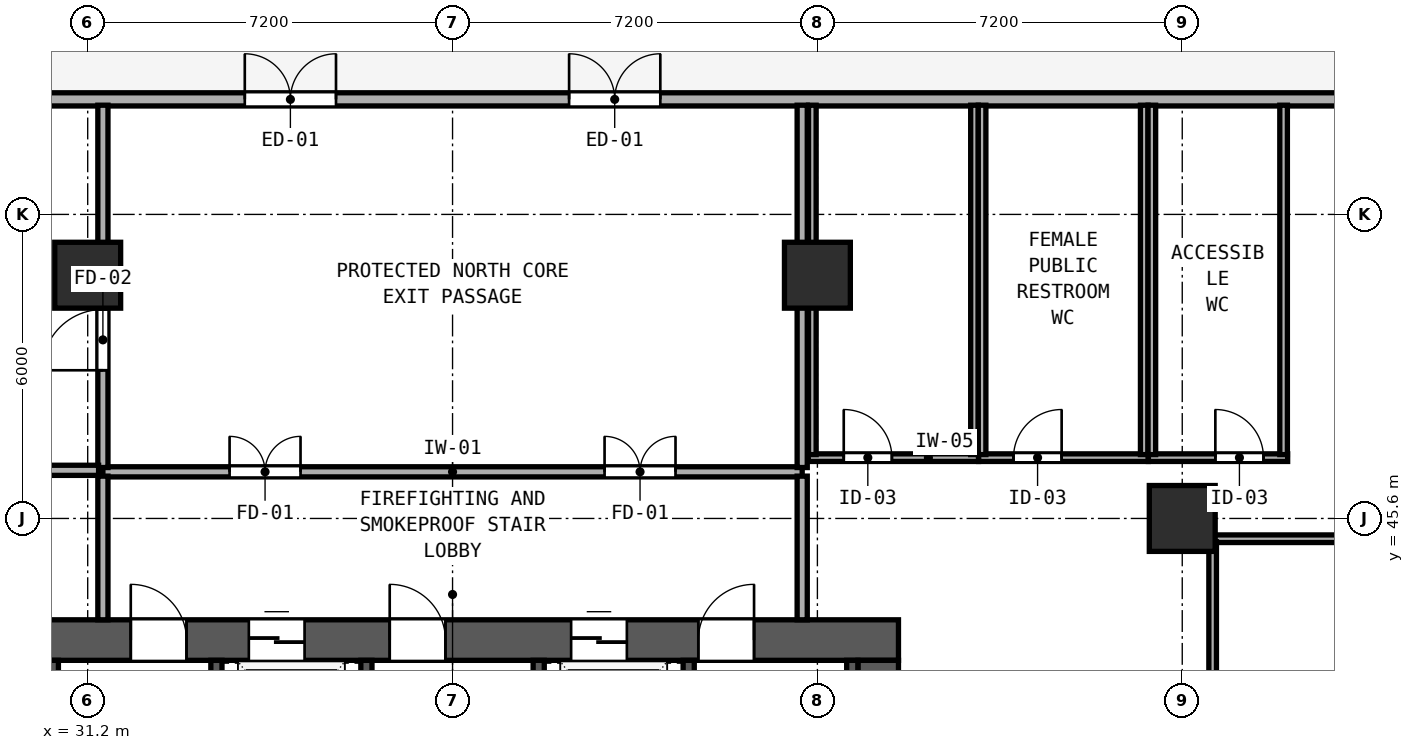
"""IFC4 building model, lengths in metres.
Left out: names, types, materials, properties, quantities, classifications, styles, units other than length and angle.
Written with IfcOpenShell. Run it as: python <this file> out.ifc"""

import sys

from ifc_helpers import new_model, si_unit, direction, frame, frame_2d, origin, origin_2d, place, context, subcontext, project, spatial, rectangle, hollow_rectangle, extrude, element, fill, save


model = new_model("IFC4")
c1 = context("Model", 3, precision=1e-05, world=origin(), true_north=direction((0.0, 1.0)))
c2 = subcontext(c1, "Body", "Model", "MODEL_VIEW")
j1 = project(units=[si_unit("LENGTHUNIT", "METRE"), si_unit("PLANEANGLEUNIT", "RADIAN")], contexts=[c1])
p1 = place(None, origin())
s1 = spatial("IfcSite", under=j1, at=p1, CompositionType="ELEMENT")
p2 = place(p1, origin())
s2 = spatial("IfcBuilding", under=s1, at=p2, CompositionType="ELEMENT")
p3 = place(p2, origin())
s3 = spatial("IfcBuildingStorey", under=s2, at=p3, CompositionType="ELEMENT", Elevation=0.0)
p4 = place(p3, frame((29.6, 43.2, 0.0), z_axis=(0.0, 0.0, 1.0), x_axis=(1.0, 0.0, 0.0)))
e1 = element("IfcWall", 1, at=p4, inside=s3, PredefinedType="SHEAR", context=c2, shape_type="SweptSolid", body=[
    extrude(rectangle(XDim=17.6, YDim=0.8, at=frame_2d((8.8, 0.0))), origin(), (0.0, 0.0, 1.0), 5.16),
])
p5 = place(p4, frame((2.45, 0.0, 0.0)))
e2 = element("IfcOpeningElement", 2, at=p5, cuts=e1, PredefinedType="OPENING", context=c2, shape_type="SweptSolid", body=[
    extrude(rectangle(XDim=1.1, YDim=2.15, at=frame_2d((0.55, 1.075))), frame((0.0, 0.41, 0.0), z_axis=(0.0, -1.0, 0.0), x_axis=(1.0, 0.0, 0.0)), (0.0, 0.0, 1.0), 0.82),
])
p6 = place(p4, frame((7.56, 0.0, 0.0)))
e3 = element("IfcOpeningElement", 3, at=p6, cuts=e1, PredefinedType="OPENING", context=c2, shape_type="SweptSolid", body=[
    extrude(rectangle(XDim=1.1, YDim=2.15, at=frame_2d((0.55, 1.075))), frame((0.0, 0.41, 0.0), z_axis=(0.0, -1.0, 0.0), x_axis=(1.0, 0.0, 0.0)), (0.0, 0.0, 1.0), 0.82),
])
p7 = place(p4, frame((13.65, 0.0, 0.0)))
e4 = element("IfcOpeningElement", 4, at=p7, cuts=e1, PredefinedType="OPENING", context=c2, shape_type="SweptSolid", body=[
    extrude(rectangle(XDim=1.1, YDim=2.15, at=frame_2d((0.55, 1.075))), frame((0.0, 0.41, 0.0), z_axis=(0.0, -1.0, 0.0), x_axis=(1.0, 0.0, 0.0)), (0.0, 0.0, 1.0), 0.82),
])
p8 = place(p4, frame((4.78, 0.0, 0.0)))
e5 = element("IfcOpeningElement", 5, at=p8, cuts=e1, PredefinedType="OPENING", context=c2, shape_type="SweptSolid", body=[
    extrude(rectangle(XDim=1.1, YDim=2.2, at=frame_2d((0.55, 1.1))), frame((0.0, 0.41, 0.0), z_axis=(0.0, -1.0, 0.0), x_axis=(1.0, 0.0, 0.0)), (0.0, 0.0, 1.0), 0.82),
])
p9 = place(p4, frame((11.14, 0.0, 0.0)))
e6 = element("IfcOpeningElement", 6, at=p9, cuts=e1, PredefinedType="OPENING", context=c2, shape_type="SweptSolid", body=[
    extrude(rectangle(XDim=1.1, YDim=2.2, at=frame_2d((0.55, 1.1))), frame((0.0, 0.41, 0.0), z_axis=(0.0, -1.0, 0.0), x_axis=(1.0, 0.0, 0.0)), (0.0, 0.0, 1.0), 0.82),
])
p10 = place(p3, frame((46.8, 32.8, 0.0), z_axis=(0.0, 0.0, 1.0), x_axis=(0.0, 1.0, 0.0)))
e7 = element("IfcWall", 7, at=p10, inside=s3, PredefinedType="SHEAR", context=c2, shape_type="SweptSolid", body=[
    extrude(rectangle(XDim=10.0, YDim=0.8, at=frame_2d((5.0, 0.0))), origin(), (0.0, 0.0, 1.0), 5.16),
])
for number, where, z_axis, x_axis in (
    (8, (30.512, 35.39, 0.0), (0.0, 0.0, 1.0), (0.0, 1.0, 0.0)),
    (9, (33.74, 35.39, 0.0), (0.0, 0.0, 1.0), (0.0, 1.0, 0.0)),
    (10, (36.7, 35.39, 0.0), (0.0, 0.0, 1.0), (0.0, 1.0, 0.0)),
    (11, (40.1, 35.39, 0.0), (0.0, 0.0, 1.0), (0.0, 1.0, 0.0)),
    (12, (43.06, 35.39, 0.0), (0.0, 0.0, 1.0), (0.0, 1.0, 0.0)),
    (13, (46.288, 35.39, 0.0), (0.0, 0.0, 1.0), (0.0, 1.0, 0.0)),
):
    element("IfcWall", number, at=place(p3, frame(where, z_axis=z_axis, x_axis=x_axis)), inside=s3, PredefinedType="SHEAR", context=c2, shape_type="SweptSolid", body=[
        extrude(rectangle(XDim=7.41, YDim=0.22, at=frame_2d((3.705, 0.0))), origin(), (0.0, 0.0, 1.0), 5.16),
    ])
for number, where, z_axis, x_axis in (
    (14, (52.8, 45.6, 0.0), (0.0, 0.0, 1.0), (1.0, 0.0, 0.0)),
    (15, (31.2, 50.4, 0.0), (0.0, 0.0, 1.0), (1.0, 0.0, 0.0)),
    (16, (45.6, 50.4, 0.0), (0.0, 0.0, 1.0), (1.0, 0.0, 0.0)),
):
    element("IfcColumn", number, at=place(p3, frame(where, z_axis=z_axis, x_axis=x_axis)), inside=s3, PredefinedType="COLUMN", context=c2, shape_type="SweptSolid", body=[
        extrude(hollow_rectangle(XDim=1.3, YDim=1.3, WallThickness=0.048, at=origin_2d()), origin(), (0.0, 0.0, 1.0), 5.4),
    ])
p11 = place(p3, frame((76.725, 53.87, 0.0), z_axis=(0.0, 0.0, 1.0), x_axis=(-1.0, 0.0, 0.0)))
e17 = element("IfcWall", 17, at=p11, inside=s3, PredefinedType="SOLIDWALL", context=c2, shape_type="SweptSolid", body=[
    extrude(rectangle(XDim=76.65, YDim=0.26, at=frame_2d((38.325, 0.0))), origin(), (0.0, 0.0, 1.0), 5.16),
])
p12 = place(p11, frame((42.425, 0.0, 0.0), z_axis=(0.0, 0.0, 1.0), x_axis=(-1.0, 0.0, 0.0)))
e18 = element("IfcOpeningElement", 18, at=p12, cuts=e17, PredefinedType="OPENING", context=c2, shape_type="SweptSolid", body=[
    extrude(rectangle(XDim=1.8, YDim=2.35, at=frame_2d((0.9, 1.175))), frame((0.0, 0.14, 0.0), z_axis=(0.0, -1.0, 0.0), x_axis=(1.0, 0.0, 0.0)), (0.0, 0.0, 1.0), 0.28),
])
p13 = place(p11, frame((36.025, 0.0, 0.0), z_axis=(0.0, 0.0, 1.0), x_axis=(-1.0, 0.0, 0.0)))
e19 = element("IfcOpeningElement", 19, at=p13, cuts=e17, PredefinedType="OPENING", context=c2, shape_type="SweptSolid", body=[
    extrude(rectangle(XDim=1.8, YDim=2.35, at=frame_2d((0.9, 1.175))), frame((0.0, 0.14, 0.0), z_axis=(0.0, -1.0, 0.0), x_axis=(1.0, 0.0, 0.0)), (0.0, 0.0, 1.0), 0.28),
])
p14 = place(p11, frame((49.475, 0.0, 0.0), z_axis=(0.0, 0.0, 1.0), x_axis=(-1.0, 0.0, 0.0)))
e20 = element("IfcOpeningElement", 20, at=p14, cuts=e17, PredefinedType="OPENING", context=c2, shape_type="SweptSolid", body=[
    extrude(rectangle(XDim=1.1, YDim=2.2, at=frame_2d((0.55, 1.1))), frame((0.0, 0.14, 0.0), z_axis=(0.0, -1.0, 0.0), x_axis=(1.0, 0.0, 0.0)), (0.0, 0.0, 1.0), 0.28),
])
p15 = place(p11, frame((6.825, 0.0, 0.0), z_axis=(0.0, 0.0, 1.0), x_axis=(-1.0, 0.0, 0.0)))
e21 = element("IfcOpeningElement", 21, at=p15, cuts=e17, PredefinedType="OPENING", context=c2, shape_type="SweptSolid", body=[
    extrude(rectangle(XDim=6.0, YDim=3.4, at=frame_2d((3.0, 1.7))), frame((0.0, 0.14, 0.0), z_axis=(0.0, -1.0, 0.0), x_axis=(1.0, 0.0, 0.0)), (0.0, 0.0, 1.0), 0.28),
])
p16 = place(p11, frame((72.225, 0.0, 0.0), z_axis=(0.0, 0.0, 1.0), x_axis=(-1.0, 0.0, 0.0)))
e22 = element("IfcOpeningElement", 22, at=p16, cuts=e17, PredefinedType="OPENING", context=c2, shape_type="SweptSolid", body=[
    extrude(rectangle(XDim=4.2, YDim=3.3, at=frame_2d((2.1, 1.65))), frame((0.0, 0.14, 0.0), z_axis=(0.0, -1.0, 0.0), x_axis=(1.0, 0.0, 0.0)), (0.0, 0.0, 1.0), 0.28),
])
p17 = place(p11, frame((20.825, 0.0, 0.0), z_axis=(0.0, 0.0, 1.0), x_axis=(-1.0, 0.0, 0.0)))
e23 = element("IfcOpeningElement", 23, at=p17, cuts=e17, PredefinedType="OPENING", context=c2, shape_type="SweptSolid", body=[
    extrude(rectangle(XDim=4.2, YDim=3.3, at=frame_2d((2.1, 1.65))), frame((0.0, 0.14, 0.0), z_axis=(0.0, -1.0, 0.0), x_axis=(1.0, 0.0, 0.0)), (0.0, 0.0, 1.0), 0.28),
])
p18 = place(p3, frame((31.5, 46.52, 0.0), z_axis=(0.0, 0.0, 1.0), x_axis=(1.0, 0.0, 0.0)))
e24 = element("IfcWall", 24, at=p18, inside=s3, PredefinedType="SOLIDWALL", context=c2, shape_type="SweptSolid", body=[
    extrude(rectangle(XDim=13.8, YDim=0.2, at=frame_2d((6.9, 0.0))), origin(), (0.0, 0.0, 1.0), 5.16),
])
p19 = place(p18, frame((2.5, 0.0, 0.0)))
e25 = element("IfcOpeningElement", 25, at=p19, cuts=e24, PredefinedType="OPENING", context=c2, shape_type="SweptSolid", body=[
    extrude(rectangle(XDim=1.4, YDim=2.2, at=frame_2d((0.7, 1.1))), frame((0.0, 0.11, 0.0), z_axis=(0.0, -1.0, 0.0), x_axis=(1.0, 0.0, 0.0)), (0.0, 0.0, 1.0), 0.22),
])
p20 = place(p18, frame((9.9, 0.0, 0.0)))
e26 = element("IfcOpeningElement", 26, at=p20, cuts=e24, PredefinedType="OPENING", context=c2, shape_type="SweptSolid", body=[
    extrude(rectangle(XDim=1.4, YDim=2.2, at=frame_2d((0.7, 1.1))), frame((0.0, 0.11, 0.0), z_axis=(0.0, -1.0, 0.0), x_axis=(1.0, 0.0, 0.0)), (0.0, 0.0, 1.0), 0.22),
])
for number, where, z_axis, x_axis in (
    (27, (31.5, 43.6, 0.0), (0.0, 0.0, 1.0), (0.0, 1.0, 0.0)),
    (28, (45.3, 43.6, 0.0), (0.0, 0.0, 1.0), (0.0, 1.0, 0.0)),
):
    element("IfcWall", number, at=place(p3, frame(where, z_axis=z_axis, x_axis=x_axis)), inside=s3, PredefinedType="SOLIDWALL", context=c2, shape_type="SweptSolid", body=[
        extrude(rectangle(XDim=2.835, YDim=0.2, at=frame_2d((1.417, 0.0))), origin(), (0.0, 0.0, 1.0), 5.16),
    ])
p21 = place(p3, frame((31.5, 46.605, 0.0), z_axis=(0.0, 0.0, 1.0), x_axis=(0.0, 1.0, 0.0)))
e29 = element("IfcWall", 29, at=p21, inside=s3, PredefinedType="SOLIDWALL", context=c2, shape_type="SweptSolid", body=[
    extrude(rectangle(XDim=7.15, YDim=0.2, at=frame_2d((3.575, 0.0))), origin(), (0.0, 0.0, 1.0), 5.16),
])
p22 = place(p21, frame((1.919, 0.0, 0.0)))
e30 = element("IfcOpeningElement", 30, at=p22, cuts=e29, PredefinedType="OPENING", context=c2, shape_type="SweptSolid", body=[
    extrude(rectangle(XDim=1.2, YDim=2.15, at=frame_2d((0.6, 1.075))), frame((0.0, 0.11, 0.0), z_axis=(0.0, -1.0, 0.0), x_axis=(1.0, 0.0, 0.0)), (0.0, 0.0, 1.0), 0.22),
])
p23 = place(p3, frame((45.3, 46.605, 0.0), z_axis=(0.0, 0.0, 1.0), x_axis=(0.0, 1.0, 0.0)))
e31 = element("IfcWall", 31, at=p23, inside=s3, PredefinedType="SOLIDWALL", context=c2, shape_type="SweptSolid", body=[
    extrude(rectangle(XDim=7.15, YDim=0.2, at=frame_2d((3.575, 0.0))), origin(), (0.0, 0.0, 1.0), 5.16),
])
p24 = place(p3, frame((24.32, 46.55, 0.0), z_axis=(0.0, 0.0, 1.0), x_axis=(1.0, 0.0, 0.0)))
e32 = element("IfcWall", 32, at=p24, inside=s3, PredefinedType="SOLIDWALL", context=c2, shape_type="SweptSolid", body=[
    extrude(rectangle(XDim=7.095, YDim=0.2, at=frame_2d((3.547, 0.0))), origin(), (0.0, 0.0, 1.0), 5.16),
])
p25 = place(p24, frame((2.2, 0.0, 0.0)))
e33 = element("IfcOpeningElement", 33, at=p25, cuts=e32, PredefinedType="OPENING", context=c2, shape_type="SweptSolid", body=[
    extrude(rectangle(XDim=1.1, YDim=2.15, at=frame_2d((0.55, 1.075))), frame((0.0, 0.11, 0.0), z_axis=(0.0, -1.0, 0.0), x_axis=(1.0, 0.0, 0.0)), (0.0, 0.0, 1.0), 0.22),
])
p26 = place(p3, frame((45.42, 46.8, 0.0), z_axis=(0.0, 0.0, 1.0), x_axis=(1.0, 0.0, 0.0)))
e34 = element("IfcWall", 34, at=p26, inside=s3, PredefinedType="PARTITIONING", context=c2, shape_type="SweptSolid", body=[
    extrude(rectangle(XDim=3.36, YDim=0.15, at=frame_2d((1.68, 0.0))), origin(), (0.0, 0.0, 1.0), 5.16),
])
p27 = place(p26, frame((0.7, 0.0, 0.0)))
e35 = element("IfcOpeningElement", 35, at=p27, cuts=e34, PredefinedType="OPENING", context=c2, shape_type="SweptSolid", body=[
    extrude(rectangle(XDim=0.95, YDim=2.12, at=frame_2d((0.475, 1.06))), frame((0.0, 0.085, 0.0), z_axis=(0.0, -1.0, 0.0), x_axis=(1.0, 0.0, 0.0)), (0.0, 0.0, 1.0), 0.17),
])
p28 = place(p3, frame((45.5, 46.86, 0.0), z_axis=(0.0, 0.0, 1.0), x_axis=(0.0, 1.0, 0.0)))
e36 = element("IfcWall", 36, at=p28, inside=s3, PredefinedType="PARTITIONING", context=c2, shape_type="SweptSolid", body=[
    extrude(rectangle(XDim=6.895, YDim=0.15, at=frame_2d((3.447, 0.0))), origin(), (0.0, 0.0, 1.0), 4.245),
])
p29 = place(p3, frame((48.7, 46.86, 0.0), z_axis=(0.0, 0.0, 1.0), x_axis=(0.0, 1.0, 0.0)))
e37 = element("IfcWall", 37, at=p29, inside=s3, PredefinedType="PARTITIONING", context=c2, shape_type="SweptSolid", body=[
    extrude(rectangle(XDim=6.895, YDim=0.15, at=frame_2d((3.447, 0.0))), origin(), (0.0, 0.0, 1.0), 5.16),
])
p30 = place(p3, frame((48.782, 46.8, 0.0), z_axis=(0.0, 0.0, 1.0), x_axis=(1.0, 0.0, 0.0)))
e38 = element("IfcWall", 38, at=p30, inside=s3, PredefinedType="PARTITIONING", context=c2, shape_type="SweptSolid", body=[
    extrude(rectangle(XDim=3.348, YDim=0.15, at=frame_2d((1.674, 0.0))), origin(), (0.0, 0.0, 1.0), 5.16),
])
p31 = place(p30, frame((0.688, 0.0, 0.0)))
e39 = element("IfcOpeningElement", 39, at=p31, cuts=e38, PredefinedType="OPENING", context=c2, shape_type="SweptSolid", body=[
    extrude(rectangle(XDim=0.95, YDim=2.12, at=frame_2d((0.475, 1.06))), frame((0.0, 0.085, 0.0), z_axis=(0.0, -1.0, 0.0), x_axis=(1.0, 0.0, 0.0)), (0.0, 0.0, 1.0), 0.17),
])
for number, where, z_axis, x_axis in (
    (40, (48.85, 46.86, 0.0), (0.0, 0.0, 1.0), (0.0, 1.0, 0.0)),
    (41, (52.05, 46.86, 0.0), (0.0, 0.0, 1.0), (0.0, 1.0, 0.0)),
):
    element("IfcWall", number, at=place(p3, frame(where, z_axis=z_axis, x_axis=x_axis)), inside=s3, PredefinedType="PARTITIONING", context=c2, shape_type="SweptSolid", body=[
        extrude(rectangle(XDim=6.895, YDim=0.15, at=frame_2d((3.447, 0.0))), origin(), (0.0, 0.0, 1.0), 5.16),
    ])
p32 = place(p3, frame((52.132, 46.8, 0.0), z_axis=(0.0, 0.0, 1.0), x_axis=(1.0, 0.0, 0.0)))
e42 = element("IfcWall", 42, at=p32, inside=s3, PredefinedType="PARTITIONING", context=c2, shape_type="SweptSolid", body=[
    extrude(rectangle(XDim=2.748, YDim=0.15, at=frame_2d((1.374, 0.0))), origin(), (0.0, 0.0, 1.0), 5.16),
])
p33 = place(p32, frame((1.321, 0.0, 0.0)))
e43 = element("IfcOpeningElement", 43, at=p33, cuts=e42, PredefinedType="OPENING", context=c2, shape_type="SweptSolid", body=[
    extrude(rectangle(XDim=0.95, YDim=2.12, at=frame_2d((0.475, 1.06))), frame((0.0, 0.085, 0.0), z_axis=(0.0, -1.0, 0.0), x_axis=(1.0, 0.0, 0.0)), (0.0, 0.0, 1.0), 0.17),
])
for number, where, z_axis, x_axis in (
    (44, (52.2, 46.86, 0.0), (0.0, 0.0, 1.0), (0.0, 1.0, 0.0)),
    (45, (54.8, 46.86, 0.0), (0.0, 0.0, 1.0), (0.0, 1.0, 0.0)),
):
    element("IfcWall", number, at=place(p3, frame(where, z_axis=z_axis, x_axis=x_axis)), inside=s3, PredefinedType="PARTITIONING", context=c2, shape_type="SweptSolid", body=[
        extrude(rectangle(XDim=6.895, YDim=0.15, at=frame_2d((3.447, 0.0))), origin(), (0.0, 0.0, 1.0), 5.16),
    ])
p34 = place(p3, frame((53.32, 45.2, 0.0), z_axis=(0.0, 0.0, 1.0), x_axis=(1.0, 0.0, 0.0)))
e46 = element("IfcWall", 46, at=p34, inside=s3, PredefinedType="PARTITIONING", context=c2, shape_type="SweptSolid", body=[
    extrude(rectangle(XDim=10.36, YDim=0.15, at=frame_2d((5.18, 0.0))), origin(), (0.0, 0.0, 1.0), 5.16),
])
p35 = place(p3, frame((53.4, 34.46, 0.0), z_axis=(0.0, 0.0, 1.0), x_axis=(0.0, 1.0, 0.0)))
e47 = element("IfcWall", 47, at=p35, inside=s3, PredefinedType="PARTITIONING", context=c2, shape_type="SweptSolid", body=[
    extrude(rectangle(XDim=10.68, YDim=0.15, at=frame_2d((5.34, 0.0))), origin(), (0.0, 0.0, 1.0), 5.16),
])
p36 = place(p35, frame((4.06, 0.0, 0.0)))
e48 = element("IfcOpeningElement", 48, at=p36, cuts=e47, PredefinedType="OPENING", context=c2, shape_type="SweptSolid", body=[
    extrude(rectangle(XDim=0.95, YDim=2.12, at=frame_2d((0.475, 1.06))), frame((0.0, 0.085, 0.0), z_axis=(0.0, -1.0, 0.0), x_axis=(1.0, 0.0, 0.0)), (0.0, 0.0, 1.0), 0.17),
])
p37 = place(p12, origin())
e49 = element("IfcDoor", 49, at=p37, inside=s3, OperationType="DOUBLE_DOOR_SINGLE_SWING", PredefinedType="DOOR", context=c2, shape_type="SweptSolid", body=[
    extrude(rectangle(XDim=1.8, YDim=2.35, at=frame_2d((0.9, 1.175))), frame((0.0, 0.025, 0.0), z_axis=(0.0, -1.0, 0.0), x_axis=(1.0, 0.0, 0.0)), (0.0, 0.0, 1.0), 0.05),
])
fill(e18, e49)
p38 = place(p13, origin())
e50 = element("IfcDoor", 50, at=p38, inside=s3, OperationType="DOUBLE_DOOR_SINGLE_SWING", PredefinedType="DOOR", context=c2, shape_type="SweptSolid", body=[
    extrude(rectangle(XDim=1.8, YDim=2.35, at=frame_2d((0.9, 1.175))), frame((0.0, 0.025, 0.0), z_axis=(0.0, -1.0, 0.0), x_axis=(1.0, 0.0, 0.0)), (0.0, 0.0, 1.0), 0.05),
])
fill(e19, e50)
p39 = place(p5, origin())
e51 = element("IfcDoor", 51, at=p39, inside=s3, OperationType="SINGLE_SWING_LEFT", PredefinedType="DOOR", context=c2, shape_type="SweptSolid", body=[
    extrude(rectangle(XDim=1.1, YDim=2.15, at=frame_2d((0.55, 1.075))), frame((0.0, 0.185, 0.0), z_axis=(0.0, -1.0, 0.0), x_axis=(1.0, 0.0, 0.0)), (0.0, 0.0, 1.0), 0.05),
])
fill(e2, e51)
p40 = place(p6, origin())
e52 = element("IfcDoor", 52, at=p40, inside=s3, OperationType="SINGLE_SWING_LEFT", PredefinedType="DOOR", context=c2, shape_type="SweptSolid", body=[
    extrude(rectangle(XDim=1.1, YDim=2.15, at=frame_2d((0.55, 1.075))), frame((0.0, 0.185, 0.0), z_axis=(0.0, -1.0, 0.0), x_axis=(1.0, 0.0, 0.0)), (0.0, 0.0, 1.0), 0.05),
])
fill(e3, e52)
p41 = place(p7, origin())
e53 = element("IfcDoor", 53, at=p41, inside=s3, OperationType="SINGLE_SWING_RIGHT", PredefinedType="DOOR", context=c2, shape_type="SweptSolid", body=[
    extrude(rectangle(XDim=1.1, YDim=2.15, at=frame_2d((0.55, 1.075))), frame((0.0, 0.185, 0.0), z_axis=(0.0, -1.0, 0.0), x_axis=(1.0, 0.0, 0.0)), (0.0, 0.0, 1.0), 0.05),
])
fill(e4, e53)
p42 = place(p19, origin())
e54 = element("IfcDoor", 54, at=p42, inside=s3, OperationType="DOUBLE_DOOR_SINGLE_SWING", PredefinedType="DOOR", context=c2, shape_type="SweptSolid", body=[
    extrude(rectangle(XDim=1.4, YDim=2.2, at=frame_2d((0.7, 1.1))), frame((0.0, 0.025, 0.0), z_axis=(0.0, -1.0, 0.0), x_axis=(1.0, 0.0, 0.0)), (0.0, 0.0, 1.0), 0.05),
])
fill(e25, e54)
p43 = place(p20, origin())
e55 = element("IfcDoor", 55, at=p43, inside=s3, OperationType="DOUBLE_DOOR_SINGLE_SWING", PredefinedType="DOOR", context=c2, shape_type="SweptSolid", body=[
    extrude(rectangle(XDim=1.4, YDim=2.2, at=frame_2d((0.7, 1.1))), frame((0.0, 0.025, 0.0), z_axis=(0.0, -1.0, 0.0), x_axis=(1.0, 0.0, 0.0)), (0.0, 0.0, 1.0), 0.05),
])
fill(e26, e55)
p44 = place(p8, origin())
e56 = element("IfcDoor", 56, at=p44, inside=s3, OperationType="SLIDING_TO_LEFT", PredefinedType="DOOR", context=c2, shape_type="SweptSolid", body=[
    extrude(rectangle(XDim=1.1, YDim=2.2, at=frame_2d((0.55, 1.1))), frame((0.0, 0.185, 0.0), z_axis=(0.0, -1.0, 0.0), x_axis=(1.0, 0.0, 0.0)), (0.0, 0.0, 1.0), 0.05),
])
fill(e5, e56)
p45 = place(p9, origin())
e57 = element("IfcDoor", 57, at=p45, inside=s3, OperationType="SLIDING_TO_LEFT", PredefinedType="DOOR", context=c2, shape_type="SweptSolid", body=[
    extrude(rectangle(XDim=1.1, YDim=2.2, at=frame_2d((0.55, 1.1))), frame((0.0, 0.185, 0.0), z_axis=(0.0, -1.0, 0.0), x_axis=(1.0, 0.0, 0.0)), (0.0, 0.0, 1.0), 0.05),
])
fill(e6, e57)
p46 = place(p22, origin())
e58 = element("IfcDoor", 58, at=p46, inside=s3, OperationType="SINGLE_SWING_LEFT", PredefinedType="DOOR", context=c2, shape_type="SweptSolid", body=[
    extrude(rectangle(XDim=1.2, YDim=2.15, at=frame_2d((0.6, 1.075))), frame((0.0, 0.025, 0.0), z_axis=(0.0, -1.0, 0.0), x_axis=(1.0, 0.0, 0.0)), (0.0, 0.0, 1.0), 0.05),
])
fill(e30, e58)
p47 = place(p27, origin())
e59 = element("IfcDoor", 59, at=p47, inside=s3, OperationType="SINGLE_SWING_LEFT", PredefinedType="DOOR", context=c2, shape_type="SweptSolid", body=[
    extrude(rectangle(XDim=0.95, YDim=2.12, at=frame_2d((0.475, 1.06))), frame((0.0, 0.025, 0.0), z_axis=(0.0, -1.0, 0.0), x_axis=(1.0, 0.0, 0.0)), (0.0, 0.0, 1.0), 0.05),
])
fill(e35, e59)
p48 = place(p31, origin())
e60 = element("IfcDoor", 60, at=p48, inside=s3, OperationType="SINGLE_SWING_RIGHT", PredefinedType="DOOR", context=c2, shape_type="SweptSolid", body=[
    extrude(rectangle(XDim=0.95, YDim=2.12, at=frame_2d((0.475, 1.06))), frame((0.0, 0.025, 0.0), z_axis=(0.0, -1.0, 0.0), x_axis=(1.0, 0.0, 0.0)), (0.0, 0.0, 1.0), 0.05),
])
fill(e39, e60)
p49 = place(p33, origin())
e61 = element("IfcDoor", 61, at=p49, inside=s3, OperationType="SINGLE_SWING_LEFT", PredefinedType="DOOR", context=c2, shape_type="SweptSolid", body=[
    extrude(rectangle(XDim=0.95, YDim=2.12, at=frame_2d((0.475, 1.06))), frame((0.0, 0.025, 0.0), z_axis=(0.0, -1.0, 0.0), x_axis=(1.0, 0.0, 0.0)), (0.0, 0.0, 1.0), 0.05),
])
fill(e43, e61)
save(model, sys.argv[1])
